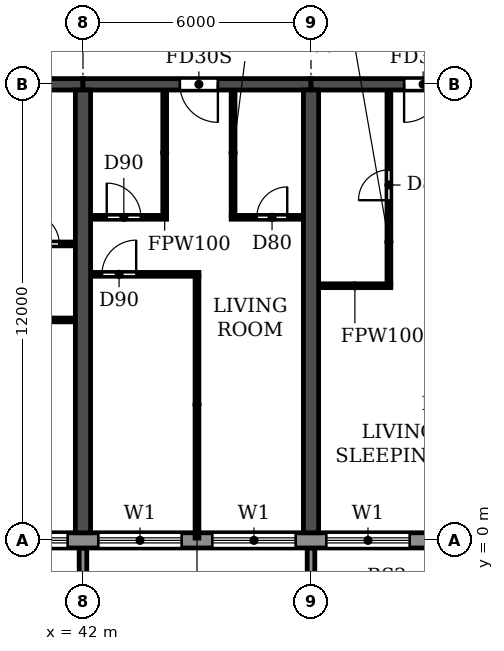
"""IFC4 building model, lengths in metres.
Left out: names, types, materials, properties, quantities, classifications, styles, units other than length and angle.
Written with IfcOpenShell. Run it as: python <this file> out.ifc"""

import sys

from ifc_helpers import new_model, si_unit, direction, frame, frame_2d, origin, place, context, subcontext, project, spatial, polyline, rectangle, outline, extrude, source, transform, mapped, element, fill, save


model = new_model("IFC4")
c1 = context("Model", 3, precision=1e-05, world=origin(), true_north=direction((0.0, 1.0)))
c2 = subcontext(c1, "Body", "Model", "MODEL_VIEW")
j1 = project(units=[si_unit("LENGTHUNIT", "METRE"), si_unit("PLANEANGLEUNIT", "RADIAN")], contexts=[c1])
p1 = place(None, origin())
s1 = spatial("IfcSite", under=j1, at=p1, CompositionType="ELEMENT")
p2 = place(p1, origin())
s2 = spatial("IfcBuilding", under=s1, at=p2, CompositionType="ELEMENT")
p3 = place(p2, frame((0.0, 0.0, 56.4)))
s3 = spatial("IfcBuildingStorey", under=s2, at=p3, CompositionType="ELEMENT", Elevation=56.4)
for number, where, z_axis, x_axis in (
    (1, (42.0, 0.2, 0.0), (0.0, 0.0, 1.0), (0.0, 1.0, 0.0)),
    (2, (48.0, 0.2, 0.0), (0.0, 0.0, 1.0), (0.0, 1.0, 0.0)),
):
    element("IfcWall", number, at=place(p3, frame(where, z_axis=z_axis, x_axis=x_axis)), inside=s3, PredefinedType="SHEAR", context=c2, shape_type="SweptSolid", body=[
        extrude(rectangle(XDim=11.65, YDim=0.4, at=frame_2d((5.825, 0.0))), origin(), (0.0, 0.0, 1.0), 3.05),
    ])
p4 = place(p3, frame((36.0, 12.0, 0.0), z_axis=(0.0, 0.0, 1.0), x_axis=(1.0, 0.0, 0.0)))
e3 = element("IfcWall", 3, at=p4, inside=s3, PredefinedType="SHEAR", context=c2, shape_type="SweptSolid", body=[
    extrude(rectangle(XDim=6.0, YDim=0.3, at=frame_2d((3.0, 0.0))), origin(), (0.0, 0.0, 1.0), 2.45),
])
p5 = place(p4, frame((2.55, 0.0, 0.0)))
e4 = element("IfcOpeningElement", 4, at=p5, cuts=e3, PredefinedType="OPENING", context=c2, shape_type="SweptSolid", body=[
    extrude(rectangle(XDim=1.0, YDim=2.1, at=frame_2d((0.5, 1.05))), frame((0.0, 0.16, 0.0), z_axis=(0.0, -1.0, 0.0), x_axis=(1.0, 0.0, 0.0)), (0.0, 0.0, 1.0), 0.32),
])
p6 = place(p3, frame((42.0, 12.0, 0.0), z_axis=(0.0, 0.0, 1.0), x_axis=(1.0, 0.0, 0.0)))
e5 = element("IfcWall", 5, at=p6, inside=s3, PredefinedType="SHEAR", context=c2, shape_type="SweptSolid", body=[
    extrude(rectangle(XDim=6.0, YDim=0.3, at=frame_2d((3.0, 0.0))), origin(), (0.0, 0.0, 1.0), 2.45),
])
p7 = place(p6, frame((2.55, 0.0, 0.0)))
e6 = element("IfcOpeningElement", 6, at=p7, cuts=e5, PredefinedType="OPENING", context=c2, shape_type="SweptSolid", body=[
    extrude(rectangle(XDim=1.0, YDim=2.1, at=frame_2d((0.5, 1.05))), frame((0.0, 0.16, 0.0), z_axis=(0.0, -1.0, 0.0), x_axis=(1.0, 0.0, 0.0)), (0.0, 0.0, 1.0), 0.32),
])
p8 = place(p3, frame((48.0, 12.0, 0.0), z_axis=(0.0, 0.0, 1.0), x_axis=(1.0, 0.0, 0.0)))
e7 = element("IfcWall", 7, at=p8, inside=s3, PredefinedType="SHEAR", context=c2, shape_type="SweptSolid", body=[
    extrude(rectangle(XDim=6.0, YDim=0.3, at=frame_2d((3.0, 0.0))), origin(), (0.0, 0.0, 1.0), 2.45),
])
p9 = place(p8, frame((2.45, 0.0, 0.0)))
e8 = element("IfcOpeningElement", 8, at=p9, cuts=e7, PredefinedType="OPENING", context=c2, shape_type="SweptSolid", body=[
    extrude(rectangle(XDim=1.0, YDim=2.1, at=frame_2d((0.5, 1.05))), frame((0.0, 0.16, 0.0), z_axis=(0.0, -1.0, 0.0), x_axis=(1.0, 0.0, 0.0)), (0.0, 0.0, 1.0), 0.32),
])
p10 = place(p3, frame((10.683, 0.0, 0.0), z_axis=(0.0, 0.0, 1.0), x_axis=(1.0, 0.0, 0.0)))
e9 = element("IfcWall", 9, at=p10, inside=s3, PredefinedType="STANDARD", context=c2, shape_type="SweptSolid", body=[
    extrude(rectangle(XDim=80.634, YDim=0.4, at=frame_2d((40.317, 0.0))), origin(), (0.0, 0.0, 1.0), 3.05),
])
p11 = place(p10, frame((1.717, 0.0, 0.9)))
e10 = element("IfcOpeningElement", 10, at=p11, cuts=e9, PredefinedType="OPENING", context=c2, shape_type="SweptSolid", body=[
    extrude(rectangle(XDim=2.2, YDim=1.5, at=frame_2d((1.1, 0.75))), frame((0.0, 0.21, 0.0), z_axis=(0.0, -1.0, 0.0), x_axis=(1.0, 0.0, 0.0)), (0.0, 0.0, 1.0), 0.42),
])
p12 = place(p10, frame((4.917, 0.0, 0.0)))
e11 = element("IfcOpeningElement", 11, at=p12, cuts=e9, PredefinedType="OPENING", context=c2, shape_type="SweptSolid", body=[
    extrude(rectangle(XDim=1.8, YDim=2.4, at=frame_2d((0.9, 1.2))), frame((0.0, 0.21, 0.0), z_axis=(0.0, -1.0, 0.0), x_axis=(1.0, 0.0, 0.0)), (0.0, 0.0, 1.0), 0.42),
])
p13 = place(p10, frame((7.717, 0.0, 0.9)))
e12 = element("IfcOpeningElement", 12, at=p13, cuts=e9, PredefinedType="OPENING", context=c2, shape_type="SweptSolid", body=[
    extrude(rectangle(XDim=2.2, YDim=1.5, at=frame_2d((1.1, 0.75))), frame((0.0, 0.21, 0.0), z_axis=(0.0, -1.0, 0.0), x_axis=(1.0, 0.0, 0.0)), (0.0, 0.0, 1.0), 0.42),
])
p14 = place(p10, frame((10.717, 0.0, 0.9)))
e13 = element("IfcOpeningElement", 13, at=p14, cuts=e9, PredefinedType="OPENING", context=c2, shape_type="SweptSolid", body=[
    extrude(rectangle(XDim=2.2, YDim=1.5, at=frame_2d((1.1, 0.75))), frame((0.0, 0.21, 0.0), z_axis=(0.0, -1.0, 0.0), x_axis=(1.0, 0.0, 0.0)), (0.0, 0.0, 1.0), 0.42),
])
p15 = place(p10, frame((13.717, 0.0, 0.9)))
e14 = element("IfcOpeningElement", 14, at=p15, cuts=e9, PredefinedType="OPENING", context=c2, shape_type="SweptSolid", body=[
    extrude(rectangle(XDim=2.2, YDim=1.5, at=frame_2d((1.1, 0.75))), frame((0.0, 0.21, 0.0), z_axis=(0.0, -1.0, 0.0), x_axis=(1.0, 0.0, 0.0)), (0.0, 0.0, 1.0), 0.42),
])
p16 = place(p10, frame((16.917, 0.0, 0.0)))
e15 = element("IfcOpeningElement", 15, at=p16, cuts=e9, PredefinedType="OPENING", context=c2, shape_type="SweptSolid", body=[
    extrude(rectangle(XDim=1.8, YDim=2.4, at=frame_2d((0.9, 1.2))), frame((0.0, 0.21, 0.0), z_axis=(0.0, -1.0, 0.0), x_axis=(1.0, 0.0, 0.0)), (0.0, 0.0, 1.0), 0.42),
])
p17 = place(p10, frame((19.717, 0.0, 0.9)))
e16 = element("IfcOpeningElement", 16, at=p17, cuts=e9, PredefinedType="OPENING", context=c2, shape_type="SweptSolid", body=[
    extrude(rectangle(XDim=2.2, YDim=1.5, at=frame_2d((1.1, 0.75))), frame((0.0, 0.21, 0.0), z_axis=(0.0, -1.0, 0.0), x_axis=(1.0, 0.0, 0.0)), (0.0, 0.0, 1.0), 0.42),
])
p18 = place(p10, frame((22.717, 0.0, 0.9)))
e17 = element("IfcOpeningElement", 17, at=p18, cuts=e9, PredefinedType="OPENING", context=c2, shape_type="SweptSolid", body=[
    extrude(rectangle(XDim=2.2, YDim=1.5, at=frame_2d((1.1, 0.75))), frame((0.0, 0.21, 0.0), z_axis=(0.0, -1.0, 0.0), x_axis=(1.0, 0.0, 0.0)), (0.0, 0.0, 1.0), 0.42),
])
p19 = place(p10, frame((25.917, 0.0, 0.0)))
e18 = element("IfcOpeningElement", 18, at=p19, cuts=e9, PredefinedType="OPENING", context=c2, shape_type="SweptSolid", body=[
    extrude(rectangle(XDim=1.8, YDim=2.4, at=frame_2d((0.9, 1.2))), frame((0.0, 0.21, 0.0), z_axis=(0.0, -1.0, 0.0), x_axis=(1.0, 0.0, 0.0)), (0.0, 0.0, 1.0), 0.42),
])
p20 = place(p10, frame((28.717, 0.0, 0.9)))
e19 = element("IfcOpeningElement", 19, at=p20, cuts=e9, PredefinedType="OPENING", context=c2, shape_type="SweptSolid", body=[
    extrude(rectangle(XDim=2.2, YDim=1.5, at=frame_2d((1.1, 0.75))), frame((0.0, 0.21, 0.0), z_axis=(0.0, -1.0, 0.0), x_axis=(1.0, 0.0, 0.0)), (0.0, 0.0, 1.0), 0.42),
])
p21 = place(p10, frame((31.717, 0.0, 0.9)))
e20 = element("IfcOpeningElement", 20, at=p21, cuts=e9, PredefinedType="OPENING", context=c2, shape_type="SweptSolid", body=[
    extrude(rectangle(XDim=2.2, YDim=1.5, at=frame_2d((1.1, 0.75))), frame((0.0, 0.21, 0.0), z_axis=(0.0, -1.0, 0.0), x_axis=(1.0, 0.0, 0.0)), (0.0, 0.0, 1.0), 0.42),
])
p22 = place(p10, frame((34.717, 0.0, 0.9)))
e21 = element("IfcOpeningElement", 21, at=p22, cuts=e9, PredefinedType="OPENING", context=c2, shape_type="SweptSolid", body=[
    extrude(rectangle(XDim=2.2, YDim=1.5, at=frame_2d((1.1, 0.75))), frame((0.0, 0.21, 0.0), z_axis=(0.0, -1.0, 0.0), x_axis=(1.0, 0.0, 0.0)), (0.0, 0.0, 1.0), 0.42),
])
p23 = place(p10, frame((37.717, 0.0, 0.9)))
e22 = element("IfcOpeningElement", 22, at=p23, cuts=e9, PredefinedType="OPENING", context=c2, shape_type="SweptSolid", body=[
    extrude(rectangle(XDim=2.2, YDim=1.5, at=frame_2d((1.1, 0.75))), frame((0.0, 0.21, 0.0), z_axis=(0.0, -1.0, 0.0), x_axis=(1.0, 0.0, 0.0)), (0.0, 0.0, 1.0), 0.42),
])
p24 = place(p10, frame((40.917, 0.0, 0.0)))
e23 = element("IfcOpeningElement", 23, at=p24, cuts=e9, PredefinedType="OPENING", context=c2, shape_type="SweptSolid", body=[
    extrude(rectangle(XDim=1.8, YDim=2.4, at=frame_2d((0.9, 1.2))), frame((0.0, 0.21, 0.0), z_axis=(0.0, -1.0, 0.0), x_axis=(1.0, 0.0, 0.0)), (0.0, 0.0, 1.0), 0.42),
])
p25 = place(p10, frame((43.717, 0.0, 0.9)))
e24 = element("IfcOpeningElement", 24, at=p25, cuts=e9, PredefinedType="OPENING", context=c2, shape_type="SweptSolid", body=[
    extrude(rectangle(XDim=2.2, YDim=1.5, at=frame_2d((1.1, 0.75))), frame((0.0, 0.21, 0.0), z_axis=(0.0, -1.0, 0.0), x_axis=(1.0, 0.0, 0.0)), (0.0, 0.0, 1.0), 0.42),
])
p26 = place(p10, frame((46.717, 0.0, 0.9)))
e25 = element("IfcOpeningElement", 25, at=p26, cuts=e9, PredefinedType="OPENING", context=c2, shape_type="SweptSolid", body=[
    extrude(rectangle(XDim=2.2, YDim=1.5, at=frame_2d((1.1, 0.75))), frame((0.0, 0.21, 0.0), z_axis=(0.0, -1.0, 0.0), x_axis=(1.0, 0.0, 0.0)), (0.0, 0.0, 1.0), 0.42),
])
p27 = place(p10, frame((49.717, 0.0, 0.9)))
e26 = element("IfcOpeningElement", 26, at=p27, cuts=e9, PredefinedType="OPENING", context=c2, shape_type="SweptSolid", body=[
    extrude(rectangle(XDim=2.2, YDim=1.5, at=frame_2d((1.1, 0.75))), frame((0.0, 0.21, 0.0), z_axis=(0.0, -1.0, 0.0), x_axis=(1.0, 0.0, 0.0)), (0.0, 0.0, 1.0), 0.42),
])
p28 = place(p10, frame((52.717, 0.0, 0.9)))
e27 = element("IfcOpeningElement", 27, at=p28, cuts=e9, PredefinedType="OPENING", context=c2, shape_type="SweptSolid", body=[
    extrude(rectangle(XDim=2.2, YDim=1.5, at=frame_2d((1.1, 0.75))), frame((0.0, 0.21, 0.0), z_axis=(0.0, -1.0, 0.0), x_axis=(1.0, 0.0, 0.0)), (0.0, 0.0, 1.0), 0.42),
])
p29 = place(p10, frame((55.717, 0.0, 0.9)))
e28 = element("IfcOpeningElement", 28, at=p29, cuts=e9, PredefinedType="OPENING", context=c2, shape_type="SweptSolid", body=[
    extrude(rectangle(XDim=2.2, YDim=1.5, at=frame_2d((1.1, 0.75))), frame((0.0, 0.21, 0.0), z_axis=(0.0, -1.0, 0.0), x_axis=(1.0, 0.0, 0.0)), (0.0, 0.0, 1.0), 0.42),
])
p30 = place(p10, frame((58.717, 0.0, 0.9)))
e29 = element("IfcOpeningElement", 29, at=p30, cuts=e9, PredefinedType="OPENING", context=c2, shape_type="SweptSolid", body=[
    extrude(rectangle(XDim=2.2, YDim=1.5, at=frame_2d((1.1, 0.75))), frame((0.0, 0.21, 0.0), z_axis=(0.0, -1.0, 0.0), x_axis=(1.0, 0.0, 0.0)), (0.0, 0.0, 1.0), 0.42),
])
p31 = place(p10, frame((61.717, 0.0, 0.9)))
e30 = element("IfcOpeningElement", 30, at=p31, cuts=e9, PredefinedType="OPENING", context=c2, shape_type="SweptSolid", body=[
    extrude(rectangle(XDim=2.2, YDim=1.5, at=frame_2d((1.1, 0.75))), frame((0.0, 0.21, 0.0), z_axis=(0.0, -1.0, 0.0), x_axis=(1.0, 0.0, 0.0)), (0.0, 0.0, 1.0), 0.42),
])
p32 = place(p10, frame((64.917, 0.0, 0.0)))
e31 = element("IfcOpeningElement", 31, at=p32, cuts=e9, PredefinedType="OPENING", context=c2, shape_type="SweptSolid", body=[
    extrude(rectangle(XDim=1.8, YDim=2.4, at=frame_2d((0.9, 1.2))), frame((0.0, 0.21, 0.0), z_axis=(0.0, -1.0, 0.0), x_axis=(1.0, 0.0, 0.0)), (0.0, 0.0, 1.0), 0.42),
])
p33 = place(p10, frame((67.717, 0.0, 0.9)))
e32 = element("IfcOpeningElement", 32, at=p33, cuts=e9, PredefinedType="OPENING", context=c2, shape_type="SweptSolid", body=[
    extrude(rectangle(XDim=2.2, YDim=1.5, at=frame_2d((1.1, 0.75))), frame((0.0, 0.21, 0.0), z_axis=(0.0, -1.0, 0.0), x_axis=(1.0, 0.0, 0.0)), (0.0, 0.0, 1.0), 0.42),
])
p34 = place(p10, frame((70.717, 0.0, 0.9)))
e33 = element("IfcOpeningElement", 33, at=p34, cuts=e9, PredefinedType="OPENING", context=c2, shape_type="SweptSolid", body=[
    extrude(rectangle(XDim=2.2, YDim=1.5, at=frame_2d((1.1, 0.75))), frame((0.0, 0.21, 0.0), z_axis=(0.0, -1.0, 0.0), x_axis=(1.0, 0.0, 0.0)), (0.0, 0.0, 1.0), 0.42),
])
p35 = place(p10, frame((73.717, 0.0, 0.9)))
e34 = element("IfcOpeningElement", 34, at=p35, cuts=e9, PredefinedType="OPENING", context=c2, shape_type="SweptSolid", body=[
    extrude(rectangle(XDim=2.2, YDim=1.5, at=frame_2d((1.1, 0.75))), frame((0.0, 0.21, 0.0), z_axis=(0.0, -1.0, 0.0), x_axis=(1.0, 0.0, 0.0)), (0.0, 0.0, 1.0), 0.42),
])
p36 = place(p10, frame((76.917, 0.0, 0.0)))
e35 = element("IfcOpeningElement", 35, at=p36, cuts=e9, PredefinedType="OPENING", context=c2, shape_type="SweptSolid", body=[
    extrude(rectangle(XDim=1.8, YDim=2.4, at=frame_2d((0.9, 1.2))), frame((0.0, 0.21, 0.0), z_axis=(0.0, -1.0, 0.0), x_axis=(1.0, 0.0, 0.0)), (0.0, 0.0, 1.0), 0.42),
])
m1 = source(origin(), c2, "Body", "SweptSolid", [
    extrude(outline(polyline([(0.0, 0.0), (0.2, 0.0), (0.2, 1.65), (0.0, 1.65), (0.0, 0.0)])), origin(), (0.0, 0.0, 1.0), 3.1),
])
for number, where in (
    (36, (41.9, -1.85, 0.0)),
    (37, (47.9, -1.85, 0.0)),
):
    element("IfcWall", number, at=place(p3, frame(where)), inside=s3, PredefinedType="STANDARD", context=c2, shape_type="MappedRepresentation", body=[
        mapped(m1, transform((0.0, 0.0, 0.0))),
    ])
p37 = place(p3, frame((38.95, 5.8, 0.0), z_axis=(0.0, 0.0, 1.0), x_axis=(1.0, 0.0, 0.0)))
e38 = element("IfcWall", 38, at=p37, inside=s3, PredefinedType="PARTITIONING", context=c2, shape_type="SweptSolid", body=[
    extrude(rectangle(XDim=2.84, YDim=0.1, at=frame_2d((1.42, 0.0))), origin(), (0.0, 0.0, 1.0), 3.05),
])
p38 = place(p37, frame((0.55, 0.0, 0.0)))
e39 = element("IfcOpeningElement", 39, at=p38, cuts=e38, PredefinedType="OPENING", context=c2, shape_type="SweptSolid", body=[
    extrude(rectangle(XDim=0.9, YDim=2.1, at=frame_2d((0.45, 1.05))), frame((0.0, 0.06, 0.0), z_axis=(0.0, -1.0, 0.0), x_axis=(1.0, 0.0, 0.0)), (0.0, 0.0, 1.0), 0.12),
])
p39 = place(p3, frame((48.21, 6.7, 0.0), z_axis=(0.0, 0.0, 1.0), x_axis=(1.0, 0.0, 0.0)))
e40 = element("IfcWall", 40, at=p39, inside=s3, PredefinedType="PARTITIONING", context=c2, shape_type="SweptSolid", body=[
    extrude(rectangle(XDim=1.89, YDim=0.1, at=frame_2d((0.945, 0.0))), origin(), (0.0, 0.0, 1.0), 3.05),
])
p40 = place(p3, frame((42.21, 7.0, 0.0), z_axis=(0.0, 0.0, 1.0), x_axis=(1.0, 0.0, 0.0)))
e41 = element("IfcWall", 41, at=p40, inside=s3, PredefinedType="PARTITIONING", context=c2, shape_type="SweptSolid", body=[
    extrude(rectangle(XDim=2.84, YDim=0.1, at=frame_2d((1.42, 0.0))), origin(), (0.0, 0.0, 1.0), 3.05),
])
p41 = place(p40, frame((0.29, 0.0, 0.0)))
e42 = element("IfcOpeningElement", 42, at=p41, cuts=e41, PredefinedType="OPENING", context=c2, shape_type="SweptSolid", body=[
    extrude(rectangle(XDim=0.9, YDim=2.1, at=frame_2d((0.45, 1.05))), frame((0.0, 0.06, 0.0), z_axis=(0.0, -1.0, 0.0), x_axis=(1.0, 0.0, 0.0)), (0.0, 0.0, 1.0), 0.12),
])
p42 = place(p3, frame((39.9, 7.8, 0.0), z_axis=(0.0, 0.0, 1.0), x_axis=(1.0, 0.0, 0.0)))
e43 = element("IfcWall", 43, at=p42, inside=s3, PredefinedType="PARTITIONING", context=c2, shape_type="SweptSolid", body=[
    extrude(rectangle(XDim=1.89, YDim=0.1, at=frame_2d((0.945, 0.0))), origin(), (0.0, 0.0, 1.0), 3.05),
])
p43 = place(p42, frame((0.675, 0.0, 0.0)))
e44 = element("IfcOpeningElement", 44, at=p43, cuts=e43, PredefinedType="OPENING", context=c2, shape_type="SweptSolid", body=[
    extrude(rectangle(XDim=0.8, YDim=2.1, at=frame_2d((0.4, 1.05))), frame((0.0, 0.06, 0.0), z_axis=(0.0, -1.0, 0.0), x_axis=(1.0, 0.0, 0.0)), (0.0, 0.0, 1.0), 0.12),
])
p44 = place(p3, frame((42.21, 8.5, 0.0), z_axis=(0.0, 0.0, 1.0), x_axis=(1.0, 0.0, 0.0)))
e45 = element("IfcWall", 45, at=p44, inside=s3, PredefinedType="PARTITIONING", context=c2, shape_type="SweptSolid", body=[
    extrude(rectangle(XDim=1.99, YDim=0.1, at=frame_2d((0.995, 0.0))), origin(), (0.0, 0.0, 1.0), 3.05),
])
p45 = place(p44, frame((0.415, 0.0, 0.0)))
e46 = element("IfcOpeningElement", 46, at=p45, cuts=e45, PredefinedType="OPENING", context=c2, shape_type="SweptSolid", body=[
    extrude(rectangle(XDim=0.9, YDim=2.1, at=frame_2d((0.45, 1.05))), frame((0.0, 0.06, 0.0), z_axis=(0.0, -1.0, 0.0), x_axis=(1.0, 0.0, 0.0)), (0.0, 0.0, 1.0), 0.12),
])
p46 = place(p3, frame((45.9, 8.5, 0.0), z_axis=(0.0, 0.0, 1.0), x_axis=(1.0, 0.0, 0.0)))
e47 = element("IfcWall", 47, at=p46, inside=s3, PredefinedType="PARTITIONING", context=c2, shape_type="SweptSolid", body=[
    extrude(rectangle(XDim=1.89, YDim=0.1, at=frame_2d((0.945, 0.0))), origin(), (0.0, 0.0, 1.0), 3.05),
])
p47 = place(p46, frame((0.675, 0.0, 0.0)))
e48 = element("IfcOpeningElement", 48, at=p47, cuts=e47, PredefinedType="OPENING", context=c2, shape_type="SweptSolid", body=[
    extrude(rectangle(XDim=0.8, YDim=2.1, at=frame_2d((0.4, 1.05))), frame((0.0, 0.06, 0.0), z_axis=(0.0, -1.0, 0.0), x_axis=(1.0, 0.0, 0.0)), (0.0, 0.0, 1.0), 0.12),
])
p48 = place(p3, frame((44.15, 8.55, 0.0), z_axis=(0.0, 0.0, 1.0), x_axis=(0.0, 1.0, 0.0)))
e49 = element("IfcWall", 49, at=p48, inside=s3, PredefinedType="PARTITIONING", context=c2, shape_type="SweptSolid", body=[
    extrude(rectangle(XDim=3.29, YDim=0.1, at=frame_2d((1.645, 0.0))), origin(), (0.0, 0.0, 1.0), 3.05),
])
p49 = place(p3, frame((45.0, 0.06, 0.0), z_axis=(0.0, 0.0, 1.0), x_axis=(0.0, 1.0, 0.0)))
e50 = element("IfcWall", 50, at=p49, inside=s3, PredefinedType="PARTITIONING", context=c2, shape_type="SweptSolid", body=[
    extrude(rectangle(XDim=6.89, YDim=0.1, at=frame_2d((3.445, 0.0))), origin(), (0.0, 0.0, 1.0), 3.05),
])
p50 = place(p3, frame((45.95, 8.55, 0.0), z_axis=(0.0, 0.0, 1.0), x_axis=(0.0, 1.0, 0.0)))
e51 = element("IfcWall", 51, at=p50, inside=s3, PredefinedType="PARTITIONING", context=c2, shape_type="SweptSolid", body=[
    extrude(rectangle(XDim=3.29, YDim=0.1, at=frame_2d((1.645, 0.0))), origin(), (0.0, 0.0, 1.0), 3.05),
])
p51 = place(p3, frame((50.05, 6.75, 0.0), z_axis=(0.0, 0.0, 1.0), x_axis=(0.0, 1.0, 0.0)))
e52 = element("IfcWall", 52, at=p51, inside=s3, PredefinedType="PARTITIONING", context=c2, shape_type="SweptSolid", body=[
    extrude(rectangle(XDim=5.09, YDim=0.1, at=frame_2d((2.545, 0.0))), origin(), (0.0, 0.0, 1.0), 3.05),
])
p52 = place(p51, frame((2.2, 0.0, 0.0)))
e53 = element("IfcOpeningElement", 53, at=p52, cuts=e52, PredefinedType="OPENING", context=c2, shape_type="SweptSolid", body=[
    extrude(rectangle(XDim=0.8, YDim=2.1, at=frame_2d((0.4, 1.05))), frame((0.0, 0.06, 0.0), z_axis=(0.0, -1.0, 0.0), x_axis=(1.0, 0.0, 0.0)), (0.0, 0.0, 1.0), 0.12),
])
p53 = place(p20, origin())
e54 = element("IfcWindow", 54, at=p53, inside=s3, PartitioningType="DOUBLE_PANEL_HORIZONTAL", PredefinedType="WINDOW", context=c2, shape_type="SweptSolid", body=[
    extrude(rectangle(XDim=2.2, YDim=1.5, at=frame_2d((1.1, 0.75))), frame((0.0, 0.03, 0.0), z_axis=(0.0, -1.0, 0.0), x_axis=(1.0, 0.0, 0.0)), (0.0, 0.0, 1.0), 0.06),
])
fill(e19, e54)
p54 = place(p21, origin())
e55 = element("IfcWindow", 55, at=p54, inside=s3, PartitioningType="DOUBLE_PANEL_HORIZONTAL", PredefinedType="WINDOW", context=c2, shape_type="SweptSolid", body=[
    extrude(rectangle(XDim=2.2, YDim=1.5, at=frame_2d((1.1, 0.75))), frame((0.0, 0.03, 0.0), z_axis=(0.0, -1.0, 0.0), x_axis=(1.0, 0.0, 0.0)), (0.0, 0.0, 1.0), 0.06),
])
fill(e20, e55)
p55 = place(p22, origin())
e56 = element("IfcWindow", 56, at=p55, inside=s3, PartitioningType="DOUBLE_PANEL_HORIZONTAL", PredefinedType="WINDOW", context=c2, shape_type="SweptSolid", body=[
    extrude(rectangle(XDim=2.2, YDim=1.5, at=frame_2d((1.1, 0.75))), frame((0.0, 0.03, 0.0), z_axis=(0.0, -1.0, 0.0), x_axis=(1.0, 0.0, 0.0)), (0.0, 0.0, 1.0), 0.06),
])
fill(e21, e56)
p56 = place(p23, origin())
e57 = element("IfcWindow", 57, at=p56, inside=s3, PartitioningType="DOUBLE_PANEL_HORIZONTAL", PredefinedType="WINDOW", context=c2, shape_type="SweptSolid", body=[
    extrude(rectangle(XDim=2.2, YDim=1.5, at=frame_2d((1.1, 0.75))), frame((0.0, 0.03, 0.0), z_axis=(0.0, -1.0, 0.0), x_axis=(1.0, 0.0, 0.0)), (0.0, 0.0, 1.0), 0.06),
])
fill(e22, e57)
p57 = place(p43, origin())
e58 = element("IfcDoor", 58, at=p57, inside=s3, OperationType="SINGLE_SWING_LEFT", PredefinedType="DOOR", context=c2, shape_type="SweptSolid", body=[
    extrude(rectangle(XDim=0.8, YDim=2.1, at=frame_2d((0.4, 1.05))), frame((0.0, 0.025, 0.0), z_axis=(0.0, -1.0, 0.0), x_axis=(1.0, 0.0, 0.0)), (0.0, 0.0, 1.0), 0.05),
])
fill(e44, e58)
p58 = place(p41, origin())
e59 = element("IfcDoor", 59, at=p58, inside=s3, OperationType="SINGLE_SWING_RIGHT", PredefinedType="DOOR", context=c2, shape_type="SweptSolid", body=[
    extrude(rectangle(XDim=0.9, YDim=2.1, at=frame_2d((0.45, 1.05))), frame((0.0, 0.025, 0.0), z_axis=(0.0, -1.0, 0.0), x_axis=(1.0, 0.0, 0.0)), (0.0, 0.0, 1.0), 0.05),
])
fill(e42, e59)
p59 = place(p45, origin())
e60 = element("IfcDoor", 60, at=p59, inside=s3, OperationType="SINGLE_SWING_LEFT", PredefinedType="DOOR", context=c2, shape_type="SweptSolid", body=[
    extrude(rectangle(XDim=0.9, YDim=2.1, at=frame_2d((0.45, 1.05))), frame((0.0, 0.025, 0.0), z_axis=(0.0, -1.0, 0.0), x_axis=(1.0, 0.0, 0.0)), (0.0, 0.0, 1.0), 0.05),
])
fill(e46, e60)
p60 = place(p7, frame((1.0, 0.0, 0.0), z_axis=(0.0, 0.0, 1.0), x_axis=(-1.0, 0.0, 0.0)))
e61 = element("IfcDoor", 61, at=p60, inside=s3, OperationType="SINGLE_SWING_LEFT", PredefinedType="DOOR", context=c2, shape_type="SweptSolid", body=[
    extrude(rectangle(XDim=1.0, YDim=2.1, at=frame_2d((0.5, 1.05))), frame((0.0, 0.025, 0.0), z_axis=(0.0, -1.0, 0.0), x_axis=(1.0, 0.0, 0.0)), (0.0, 0.0, 1.0), 0.05),
])
fill(e6, e61)
p61 = place(p47, origin())
e62 = element("IfcDoor", 62, at=p61, inside=s3, OperationType="SINGLE_SWING_RIGHT", PredefinedType="DOOR", context=c2, shape_type="SweptSolid", body=[
    extrude(rectangle(XDim=0.8, YDim=2.1, at=frame_2d((0.4, 1.05))), frame((0.0, 0.025, 0.0), z_axis=(0.0, -1.0, 0.0), x_axis=(1.0, 0.0, 0.0)), (0.0, 0.0, 1.0), 0.05),
])
fill(e48, e62)
p62 = place(p52, origin())
e63 = element("IfcDoor", 63, at=p62, inside=s3, OperationType="SINGLE_SWING_LEFT", PredefinedType="DOOR", context=c2, shape_type="SweptSolid", body=[
    extrude(rectangle(XDim=0.8, YDim=2.1, at=frame_2d((0.4, 1.05))), frame((0.0, 0.025, 0.0), z_axis=(0.0, -1.0, 0.0), x_axis=(1.0, 0.0, 0.0)), (0.0, 0.0, 1.0), 0.05),
])
fill(e53, e63)
p63 = place(p9, frame((1.0, 0.0, 0.0), z_axis=(0.0, 0.0, 1.0), x_axis=(-1.0, 0.0, 0.0)))
e64 = element("IfcDoor", 64, at=p63, inside=s3, OperationType="SINGLE_SWING_RIGHT", PredefinedType="DOOR", context=c2, shape_type="SweptSolid", body=[
    extrude(rectangle(XDim=1.0, YDim=2.1, at=frame_2d((0.5, 1.05))), frame((0.0, 0.025, 0.0), z_axis=(0.0, -1.0, 0.0), x_axis=(1.0, 0.0, 0.0)), (0.0, 0.0, 1.0), 0.05),
])
fill(e8, e64)
save(model, sys.argv[1])
